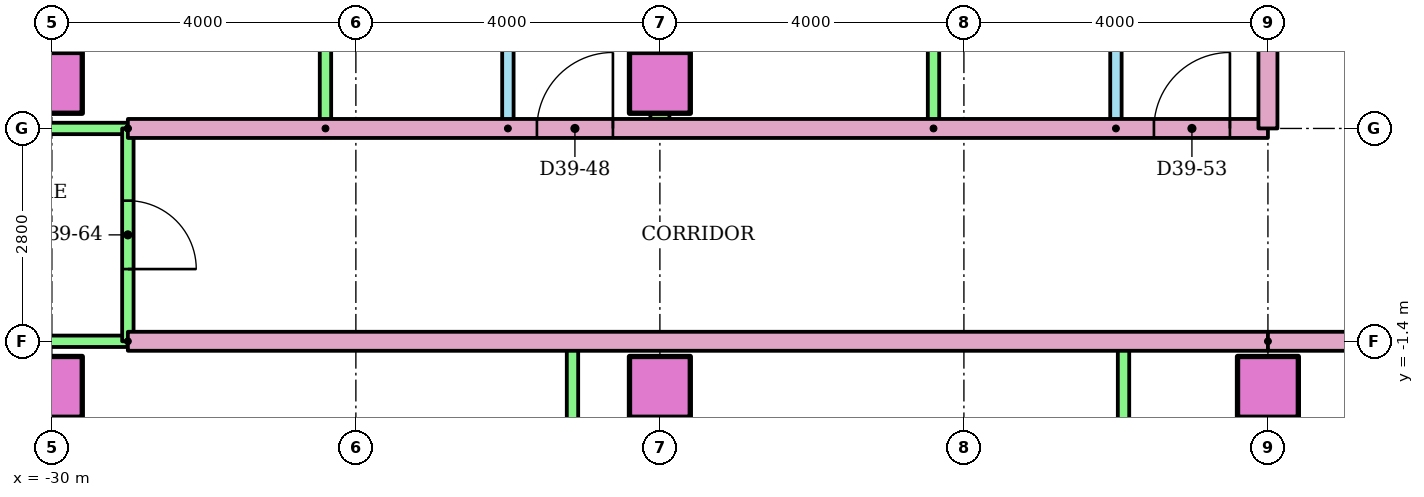
"""IFC4 building model, lengths in metres.
Left out: names, types, materials, properties, quantities, classifications, styles, units other than length and angle.
Written with IfcOpenShell. Run it as: python <this file> out.ifc"""

import sys

from ifc_helpers import new_model, si_unit, direction, frame, frame_2d, origin, origin_2d, place, context, subcontext, project, spatial, rectangle, extrude, element, fill, save


model = new_model("IFC4")
c1 = context("Model", 3, precision=1e-05, world=origin(), true_north=direction((0.0, 1.0)))
c2 = subcontext(c1, "Body", "Model", "MODEL_VIEW")
j1 = project(units=[si_unit("LENGTHUNIT", "METRE"), si_unit("PLANEANGLEUNIT", "RADIAN")], contexts=[c1])
p1 = place(None, origin())
s1 = spatial("IfcSite", under=j1, at=p1, CompositionType="ELEMENT")
p2 = place(p1, origin())
s2 = spatial("IfcBuilding", under=s1, at=p2, CompositionType="ELEMENT")
p3 = place(p2, frame((0.0, 0.0, 148.6)))
s3 = spatial("IfcBuildingStorey", under=s2, at=p3, CompositionType="ELEMENT", Elevation=148.6)
for number, where in (
    (1, (-30.0, -2.0, 0.0)),
    (2, (-22.0, -2.0, 0.0)),
    (3, (-14.0, -2.0, 0.0)),
    (4, (-30.0, 2.0, 0.0)),
    (5, (-22.0, 2.0, 0.0)),
):
    element("IfcColumn", number, at=place(p3, frame(where)), inside=s3, PredefinedType="COLUMN", context=c2, shape_type="SweptSolid", body=[
        extrude(rectangle(XDim=0.8, YDim=0.8, at=origin_2d()), origin(), (0.0, 0.0, 1.0), 3.2),
    ])
for number, where, z_axis, x_axis in (
    (6, (-15.9, -8.4, 0.0), (0.0, 0.0, 1.0), (0.0, 1.0, 0.0)),
    (7, (-23.15, -8.4, 0.0), (0.0, 0.0, 1.0), (0.0, 1.0, 0.0)),
):
    element("IfcWall", number, at=place(p3, frame(where, z_axis=z_axis, x_axis=x_axis)), inside=s3, PredefinedType="PARTITIONING", context=c2, shape_type="SweptSolid", body=[
        extrude(rectangle(XDim=7.0, YDim=0.15, at=frame_2d((3.5, 0.0))), origin(), (0.0, 0.0, 1.0), 2.4),
    ])
p4 = place(p3, frame((-14.0, -1.4, 0.0), z_axis=(0.0, 0.0, 1.0), x_axis=(-1.0, 0.0, 0.0)))
e8 = element("IfcWall", 8, at=p4, inside=s3, PredefinedType="PARTITIONING", context=c2, shape_type="SweptSolid", body=[
    extrude(rectangle(XDim=15.0, YDim=0.25, at=frame_2d((7.5, 0.0))), origin(), (0.0, 0.0, 1.0), 2.4),
])
p5 = place(p3, frame((-29.0, -1.4, 0.0), z_axis=(0.0, 0.0, 1.0), x_axis=(-1.0, 0.0, 0.0)))
e9 = element("IfcWall", 9, at=p5, inside=s3, PredefinedType="PARTITIONING", context=c2, shape_type="SweptSolid", body=[
    extrude(rectangle(XDim=3.72, YDim=0.15, at=frame_2d((1.86, 0.0))), origin(), (0.0, 0.0, 1.0), 2.4),
])
p6 = place(p3, frame((-24.0, 1.4, 0.0), z_axis=(0.0, 0.0, 1.0), x_axis=(0.0, 1.0, 0.0)))
e10 = element("IfcWall", 10, at=p6, inside=s3, PredefinedType="PARTITIONING", context=c2, shape_type="SweptSolid", body=[
    extrude(rectangle(XDim=9.4, YDim=0.15, at=frame_2d((4.7, 0.0))), origin(), (0.0, 0.0, 1.0), 2.4),
])
p7 = place(p6, frame((2.175, 0.0, 0.0)))
e11 = element("IfcOpeningElement", 11, at=p7, cuts=e10, PredefinedType="OPENING", context=c2, shape_type="SweptSolid", body=[
    extrude(rectangle(XDim=0.9, YDim=2.1, at=frame_2d((0.45, 1.05))), frame((0.0, 0.085, 0.0), z_axis=(0.0, -1.0, 0.0), x_axis=(1.0, 0.0, 0.0)), (0.0, 0.0, 1.0), 0.17),
])
p8 = place(p6, frame((6.925, 0.0, 0.0)))
e12 = element("IfcOpeningElement", 12, at=p8, cuts=e10, PredefinedType="OPENING", context=c2, shape_type="SweptSolid", body=[
    extrude(rectangle(XDim=0.8, YDim=2.1, at=frame_2d((0.4, 1.05))), frame((0.0, 0.085, 0.0), z_axis=(0.0, -1.0, 0.0), x_axis=(1.0, 0.0, 0.0)), (0.0, 0.0, 1.0), 0.17),
])
p9 = place(p3, frame((-26.4, 1.4, 0.0), z_axis=(0.0, 0.0, 1.0), x_axis=(0.0, 1.0, 0.0)))
e13 = element("IfcWall", 13, at=p9, inside=s3, PredefinedType="PARTITIONING", context=c2, shape_type="SweptSolid", body=[
    extrude(rectangle(XDim=9.4, YDim=0.15, at=frame_2d((4.7, 0.0))), origin(), (0.0, 0.0, 1.0), 2.4),
])
p10 = place(p3, frame((-16.0, 1.4, 0.0), z_axis=(0.0, 0.0, 1.0), x_axis=(0.0, 1.0, 0.0)))
e14 = element("IfcWall", 14, at=p10, inside=s3, PredefinedType="PARTITIONING", context=c2, shape_type="SweptSolid", body=[
    extrude(rectangle(XDim=9.4, YDim=0.15, at=frame_2d((4.7, 0.0))), origin(), (0.0, 0.0, 1.0), 2.4),
])
p11 = place(p10, frame((2.175, 0.0, 0.0)))
e15 = element("IfcOpeningElement", 15, at=p11, cuts=e14, PredefinedType="OPENING", context=c2, shape_type="SweptSolid", body=[
    extrude(rectangle(XDim=0.9, YDim=2.1, at=frame_2d((0.45, 1.05))), frame((0.0, 0.085, 0.0), z_axis=(0.0, -1.0, 0.0), x_axis=(1.0, 0.0, 0.0)), (0.0, 0.0, 1.0), 0.17),
])
p12 = place(p10, frame((6.925, 0.0, 0.0)))
e16 = element("IfcOpeningElement", 16, at=p12, cuts=e14, PredefinedType="OPENING", context=c2, shape_type="SweptSolid", body=[
    extrude(rectangle(XDim=0.8, YDim=2.1, at=frame_2d((0.4, 1.05))), frame((0.0, 0.085, 0.0), z_axis=(0.0, -1.0, 0.0), x_axis=(1.0, 0.0, 0.0)), (0.0, 0.0, 1.0), 0.17),
])
p13 = place(p3, frame((-18.4, 1.4, 0.0), z_axis=(0.0, 0.0, 1.0), x_axis=(0.0, 1.0, 0.0)))
e17 = element("IfcWall", 17, at=p13, inside=s3, PredefinedType="PARTITIONING", context=c2, shape_type="SweptSolid", body=[
    extrude(rectangle(XDim=9.4, YDim=0.15, at=frame_2d((4.7, 0.0))), origin(), (0.0, 0.0, 1.0), 2.4),
])
p14 = place(p3, frame((-22.0, 18.721, 0.0), z_axis=(0.0, 0.0, 1.0), x_axis=(0.0, -1.0, 0.0)))
e18 = element("IfcWall", 18, at=p14, inside=s3, PredefinedType="PARTITIONING", context=c2, shape_type="SweptSolid", body=[
    extrude(rectangle(XDim=17.321, YDim=0.25, at=frame_2d((8.661, 0.0))), origin(), (0.0, 0.0, 1.0), 2.4),
])
p15 = place(p3, frame((-29.0, 1.4, 0.0)))
e19 = element("IfcWall", 19, at=p15, inside=s3, PredefinedType="PARTITIONING", context=c2, shape_type="SweptSolid", body=[
    extrude(rectangle(XDim=15.0, YDim=0.25, at=frame_2d((7.5, 0.0))), origin(), (0.0, 0.0, 1.0), 2.4),
])
p16 = place(p15, frame((5.382, 0.0, 0.0)))
e20 = element("IfcOpeningElement", 20, at=p16, cuts=e19, PredefinedType="OPENING", context=c2, shape_type="SweptSolid", body=[
    extrude(rectangle(XDim=1.0, YDim=2.1, at=frame_2d((0.5, 1.05))), frame((0.0, 0.135, 0.0), z_axis=(0.0, -1.0, 0.0), x_axis=(1.0, 0.0, 0.0)), (0.0, 0.0, 1.0), 0.27),
])
p17 = place(p15, frame((13.5, 0.0, 0.0)))
e21 = element("IfcOpeningElement", 21, at=p17, cuts=e19, PredefinedType="OPENING", context=c2, shape_type="SweptSolid", body=[
    extrude(rectangle(XDim=1.0, YDim=2.1, at=frame_2d((0.5, 1.05))), frame((0.0, 0.135, 0.0), z_axis=(0.0, -1.0, 0.0), x_axis=(1.0, 0.0, 0.0)), (0.0, 0.0, 1.0), 0.27),
])
p18 = place(p3, frame((-32.72, 1.4, 0.0)))
e22 = element("IfcWall", 22, at=p18, inside=s3, PredefinedType="PARTITIONING", context=c2, shape_type="SweptSolid", body=[
    extrude(rectangle(XDim=3.72, YDim=0.15, at=frame_2d((1.86, 0.0))), origin(), (0.0, 0.0, 1.0), 2.4),
])
p19 = place(p3, frame((-29.0, 1.4, 0.0), z_axis=(0.0, 0.0, 1.0), x_axis=(0.0, -1.0, 0.0)))
e23 = element("IfcWall", 23, at=p19, inside=s3, PredefinedType="PARTITIONING", context=c2, shape_type="SweptSolid", body=[
    extrude(rectangle(XDim=2.8, YDim=0.15, at=frame_2d((1.4, 0.0))), origin(), (0.0, 0.0, 1.0), 2.4),
])
p20 = place(p19, frame((0.95, 0.0, 0.0)))
e24 = element("IfcOpeningElement", 24, at=p20, cuts=e23, PredefinedType="OPENING", context=c2, shape_type="SweptSolid", body=[
    extrude(rectangle(XDim=0.9, YDim=2.1, at=frame_2d((0.45, 1.05))), frame((0.0, 0.085, 0.0), z_axis=(0.0, -1.0, 0.0), x_axis=(1.0, 0.0, 0.0)), (0.0, 0.0, 1.0), 0.17),
])
p21 = place(p3, frame((14.0, -1.4, 0.0), z_axis=(0.0, 0.0, 1.0), x_axis=(-1.0, 0.0, 0.0)))
e25 = element("IfcWall", 25, at=p21, inside=s3, PredefinedType="PARTITIONING", context=c2, shape_type="SweptSolid", body=[
    extrude(rectangle(XDim=28.0, YDim=0.25, at=frame_2d((14.0, 0.0))), origin(), (0.0, 0.0, 1.0), 2.4),
])
p22 = place(p21, frame((20.618, 0.0, 0.0)))
e26 = element("IfcOpeningElement", 26, at=p22, cuts=e25, PredefinedType="OPENING", context=c2, shape_type="SweptSolid", body=[
    extrude(rectangle(XDim=1.0, YDim=2.1, at=frame_2d((0.5, 1.05))), frame((0.0, 0.135, 0.0), z_axis=(0.0, -1.0, 0.0), x_axis=(1.0, 0.0, 0.0)), (0.0, 0.0, 1.0), 0.27),
])
p23 = place(p21, frame((18.382, 0.0, 0.0)))
e27 = element("IfcOpeningElement", 27, at=p23, cuts=e25, PredefinedType="OPENING", context=c2, shape_type="SweptSolid", body=[
    extrude(rectangle(XDim=1.0, YDim=2.1, at=frame_2d((0.5, 1.05))), frame((0.0, 0.135, 0.0), z_axis=(0.0, -1.0, 0.0), x_axis=(1.0, 0.0, 0.0)), (0.0, 0.0, 1.0), 0.27),
])
p24 = place(p3, frame((-14.0, 3.0, 0.0), z_axis=(0.0, 0.0, 1.0), x_axis=(0.0, -1.0, 0.0)))
e28 = element("IfcWall", 28, at=p24, inside=s3, PredefinedType="PARTITIONING", context=c2, shape_type="SweptSolid", body=[
    extrude(rectangle(XDim=1.6, YDim=0.25, at=frame_2d((0.8, 0.0))), origin(), (0.0, 0.0, 1.0), 2.4),
])
p25 = place(p16, origin())
e29 = element("IfcDoor", 29, at=p25, inside=s3, OperationType="SINGLE_SWING_RIGHT", PredefinedType="DOOR", context=c2, shape_type="SweptSolid", body=[
    extrude(rectangle(XDim=1.0, YDim=2.1, at=frame_2d((0.5, 1.05))), frame((0.0, 0.025, 0.0), z_axis=(0.0, -1.0, 0.0), x_axis=(1.0, 0.0, 0.0)), (0.0, 0.0, 1.0), 0.05),
])
fill(e20, e29)
p26 = place(p17, origin())
e30 = element("IfcDoor", 30, at=p26, inside=s3, OperationType="SINGLE_SWING_RIGHT", PredefinedType="DOOR", context=c2, shape_type="SweptSolid", body=[
    extrude(rectangle(XDim=1.0, YDim=2.1, at=frame_2d((0.5, 1.05))), frame((0.0, 0.025, 0.0), z_axis=(0.0, -1.0, 0.0), x_axis=(1.0, 0.0, 0.0)), (0.0, 0.0, 1.0), 0.05),
])
fill(e21, e30)
p27 = place(p20, origin())
e31 = element("IfcDoor", 31, at=p27, inside=s3, OperationType="SINGLE_SWING_RIGHT", PredefinedType="DOOR", context=c2, shape_type="SweptSolid", body=[
    extrude(rectangle(XDim=0.9, YDim=2.1, at=frame_2d((0.45, 1.05))), frame((0.0, 0.025, 0.0), z_axis=(0.0, -1.0, 0.0), x_axis=(1.0, 0.0, 0.0)), (0.0, 0.0, 1.0), 0.05),
])
fill(e24, e31)
save(model, sys.argv[1])
